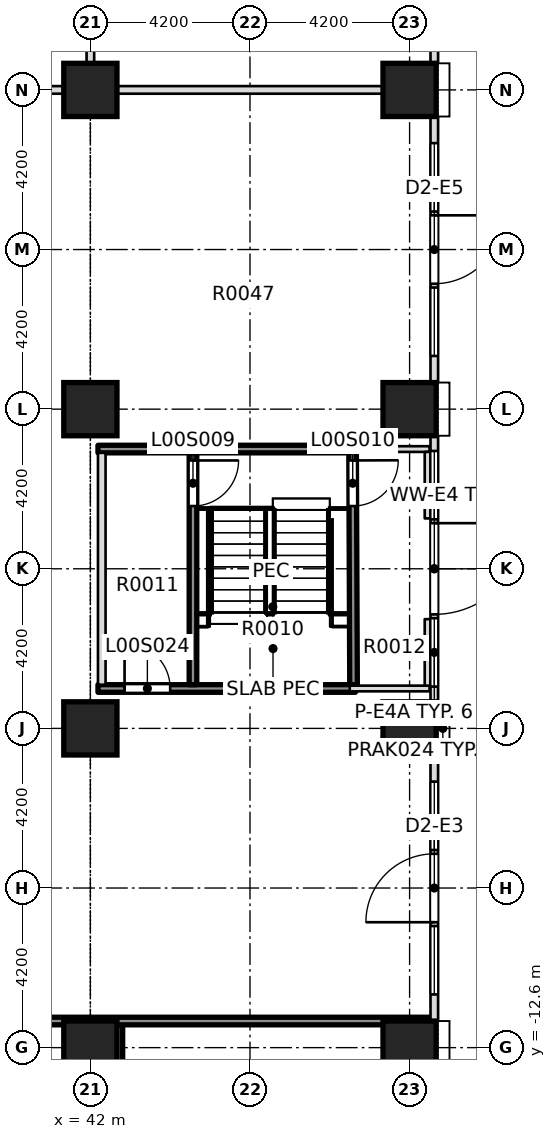
"""IFC4 building model, lengths in metres.
Left out: names, types, materials, properties, quantities, classifications, styles, units other than length and angle.
Written with IfcOpenShell. Run it as: python <this file> out.ifc"""

import sys

from ifc_helpers import new_model, si_unit, direction, frame, frame_2d, origin, origin_2d, place, context, subcontext, project, spatial, rectangle, extrude, element, fill, save


model = new_model("IFC4")
c1 = context("Model", 3, precision=1e-05, world=origin(), true_north=direction((0.0, 1.0)))
c2 = subcontext(c1, "Body", "Model", "MODEL_VIEW")
j1 = project(units=[si_unit("LENGTHUNIT", "METRE"), si_unit("PLANEANGLEUNIT", "RADIAN")], contexts=[c1])
p1 = place(None, origin())
s1 = spatial("IfcSite", under=j1, at=p1, CompositionType="ELEMENT")
p2 = place(p1, origin())
s2 = spatial("IfcBuilding", under=s1, at=p2, CompositionType="ELEMENT")
p3 = place(p2, origin())
s3 = spatial("IfcBuildingStorey", under=s2, at=p3, CompositionType="ELEMENT", Elevation=0.0)
for number, where, z_axis, x_axis in (
    (1, (42.0, -12.6, 0.0), (0.0, 0.0, 1.0), (1.0, 0.0, 0.0)),
    (2, (50.4, -12.6, 0.0), (0.0, 0.0, 1.0), (1.0, 0.0, 0.0)),
    (3, (42.0, -4.2, 0.0), (0.0, 0.0, 1.0), (1.0, 0.0, 0.0)),
    (4, (50.4, -4.2, 0.0), (0.0, 0.0, 1.0), (1.0, 0.0, 0.0)),
    (5, (42.0, 4.2, 0.0), (0.0, 0.0, 1.0), (1.0, 0.0, 0.0)),
    (6, (50.4, 4.2, 0.0), (0.0, 0.0, 1.0), (1.0, 0.0, 0.0)),
    (7, (42.0, 12.6, 0.0), (0.0, 0.0, 1.0), (1.0, 0.0, 0.0)),
    (8, (50.4, 12.6, 0.0), (0.0, 0.0, 1.0), (1.0, 0.0, 0.0)),
):
    element("IfcColumn", number, at=place(p3, frame(where, z_axis=z_axis, x_axis=x_axis)), inside=s3, PredefinedType="COLUMN", context=c2, shape_type="SweptSolid", body=[
        extrude(rectangle(XDim=1.4, YDim=1.4, at=origin_2d()), origin(), (0.0, 0.0, 1.0), 7.5),
    ])
p4 = place(p3, frame((42.2, -3.15, 0.0), z_axis=(0.0, 0.0, 1.0), x_axis=(1.0, 0.0, 0.0)))
e9 = element("IfcWall", 9, at=p4, inside=s3, PredefinedType="SOLIDWALL", context=c2, shape_type="SweptSolid", body=[
    extrude(rectangle(XDim=6.775, YDim=0.2, at=frame_2d((3.388, 0.0))), origin(), (0.0, 0.0, 1.0), 7.1),
])
p5 = place(p4, frame((0.7, 0.0, 0.0)))
e10 = element("IfcOpeningElement", 10, at=p5, cuts=e9, PredefinedType="OPENING", context=c2, shape_type="SweptSolid", body=[
    extrude(rectangle(XDim=1.2, YDim=2.1, at=frame_2d((0.6, 1.05))), frame((0.0, 0.11, 0.0), z_axis=(0.0, -1.0, 0.0), x_axis=(1.0, 0.0, 0.0)), (0.0, 0.0, 1.0), 0.22),
])
p6 = place(p3, frame((48.825, -3.15, 0.0), z_axis=(0.0, 0.0, 1.0), x_axis=(1.0, 0.0, 0.0)))
e11 = element("IfcWall", 11, at=p6, inside=s3, PredefinedType="PARTITIONING", context=c2, shape_type="SweptSolid", body=[
    extrude(rectangle(XDim=2.1, YDim=0.15, at=frame_2d((1.05, 0.0))), origin(), (0.0, 0.0, 1.0), 7.1),
])
p7 = place(p3, frame((42.2, 3.15, 0.0), z_axis=(0.0, 0.0, 1.0), x_axis=(1.0, 0.0, 0.0)))
e12 = element("IfcWall", 12, at=p7, inside=s3, PredefinedType="SOLIDWALL", context=c2, shape_type="SweptSolid", body=[
    extrude(rectangle(XDim=6.775, YDim=0.2, at=frame_2d((3.388, 0.0))), origin(), (0.0, 0.0, 1.0), 7.1),
])
p8 = place(p3, frame((48.825, 3.15, 0.0), z_axis=(0.0, 0.0, 1.0), x_axis=(1.0, 0.0, 0.0)))
e13 = element("IfcWall", 13, at=p8, inside=s3, PredefinedType="PARTITIONING", context=c2, shape_type="SweptSolid", body=[
    extrude(rectangle(XDim=2.1, YDim=0.15, at=frame_2d((1.05, 0.0))), origin(), (0.0, 0.0, 1.0), 7.1),
])
p9 = place(p3, frame((16.875, 12.6, 0.0), z_axis=(0.0, 0.0, 1.0), x_axis=(1.0, 0.0, 0.0)))
e14 = element("IfcWall", 14, at=p9, inside=s3, PredefinedType="PARTITIONING", context=c2, shape_type="SweptSolid", body=[
    extrude(rectangle(XDim=34.075, YDim=0.2, at=frame_2d((17.038, 0.0))), origin(), (0.0, 0.0, 1.0), 7.1),
])
p10 = place(p9, frame((17.525, 0.0, 0.0)))
e15 = element("IfcOpeningElement", 15, at=p10, cuts=e14, PredefinedType="OPENING", context=c2, shape_type="SweptSolid", body=[
    extrude(rectangle(XDim=0.9, YDim=2.1, at=frame_2d((0.45, 1.05))), frame((0.0, 0.11, 0.0), z_axis=(0.0, -1.0, 0.0), x_axis=(1.0, 0.0, 0.0)), (0.0, 0.0, 1.0), 0.22),
])
p11 = place(p3, frame((42.0, 12.7, 0.0), z_axis=(0.0, 0.0, 1.0), x_axis=(0.0, 1.0, 0.0)))
e16 = element("IfcWall", 16, at=p11, inside=s3, PredefinedType="PARTITIONING", context=c2, shape_type="SweptSolid", body=[
    extrude(rectangle(XDim=8.525, YDim=0.2, at=frame_2d((4.263, 0.0))), origin(), (0.0, 0.0, 1.0), 7.1),
])
p12 = place(p11, frame((3.812, 0.0, 0.0)))
e17 = element("IfcOpeningElement", 17, at=p12, cuts=e16, PredefinedType="OPENING", context=c2, shape_type="SweptSolid", body=[
    extrude(rectangle(XDim=0.9, YDim=2.1, at=frame_2d((0.45, 1.05))), frame((0.0, 0.11, 0.0), z_axis=(0.0, -1.0, 0.0), x_axis=(1.0, 0.0, 0.0)), (0.0, 0.0, 1.0), 0.22),
])
p13 = place(p3, frame((42.3, -3.05, 0.0), z_axis=(0.0, 0.0, 1.0), x_axis=(0.0, 1.0, 0.0)))
e18 = element("IfcWall", 18, at=p13, inside=s3, PredefinedType="PARTITIONING", context=c2, shape_type="SweptSolid", body=[
    extrude(rectangle(XDim=6.1, YDim=0.2, at=frame_2d((3.05, 0.0))), origin(), (0.0, 0.0, 1.0), 7.1),
])
p14 = place(p3, frame((44.7, -3.05, 0.0), z_axis=(0.0, 0.0, 1.0), x_axis=(0.0, 1.0, 0.0)))
e19 = element("IfcWall", 19, at=p14, inside=s3, PredefinedType="SOLIDWALL", context=c2, shape_type="SweptSolid", body=[
    extrude(rectangle(XDim=6.1, YDim=0.2, at=frame_2d((3.05, 0.0))), origin(), (0.0, 0.0, 1.0), 7.1),
])
p15 = place(p14, frame((4.7, 0.0, 0.0)))
e20 = element("IfcOpeningElement", 20, at=p15, cuts=e19, PredefinedType="OPENING", context=c2, shape_type="SweptSolid", body=[
    extrude(rectangle(XDim=1.2, YDim=2.1, at=frame_2d((0.6, 1.05))), frame((0.0, 0.11, 0.0), z_axis=(0.0, -1.0, 0.0), x_axis=(1.0, 0.0, 0.0)), (0.0, 0.0, 1.0), 0.22),
])
p16 = place(p3, frame((48.925, -3.05, 0.0), z_axis=(0.0, 0.0, 1.0), x_axis=(-0.004065655173, 0.99999173519, 0.0)))
e21 = element("IfcWall", 21, at=p16, inside=s3, PredefinedType="SOLIDWALL", context=c2, shape_type="SweptSolid", body=[
    extrude(rectangle(XDim=6.125, YDim=0.2, at=frame_2d((3.062, 0.0))), origin(), (0.0, 0.0, 1.0), 7.1),
])
p17 = place(p16, frame((4.7, 0.0, 0.0)))
e22 = element("IfcOpeningElement", 22, at=p17, cuts=e21, PredefinedType="OPENING", context=c2, shape_type="SweptSolid", body=[
    extrude(rectangle(XDim=1.2, YDim=2.1, at=frame_2d((0.6, 1.05))), frame((0.0, 0.11, 0.0), z_axis=(0.0, -1.0, 0.0), x_axis=(1.0, 0.0, 0.0)), (0.0, 0.0, 1.0), 0.22),
])
p18 = place(p3, frame((50.873, -3.075, 0.0), z_axis=(0.0, 0.0, 1.0), x_axis=(0.0, 1.0, 0.0)))
e23 = element("IfcWall", 23, at=p18, inside=s3, PredefinedType="PARTITIONING", context=c2, shape_type="SweptSolid", body=[
    extrude(rectangle(XDim=1.75, YDim=0.15, at=frame_2d((0.875, 0.0))), origin(), (0.0, 0.0, 1.0), 7.1),
])
p19 = place(p3, frame((51.05, -4.9, 0.0), z_axis=(0.0, 0.0, 1.0), x_axis=(0.0, -1.0, 0.0)))
e24 = element("IfcWall", 24, at=p19, inside=s3, PredefinedType="STANDARD", context=c2, shape_type="SweptSolid", body=[
    extrude(rectangle(XDim=7.0, YDim=0.2, at=frame_2d((3.5, 0.0))), origin(), (0.0, 0.0, 1.0), 7.1),
])
p20 = place(p19, frame((4.5, 0.0, 0.3)))
e25 = element("IfcOpeningElement", 25, at=p20, cuts=e24, PredefinedType="OPENING", context=c2, shape_type="SweptSolid", body=[
    extrude(rectangle(XDim=1.8, YDim=4.2, at=frame_2d((0.9, 2.1))), frame((0.0, 0.11, 0.0), z_axis=(0.0, -1.0, 0.0), x_axis=(1.0, 0.0, 0.0)), (0.0, 0.0, 1.0), 0.22),
])
p21 = place(p19, frame((2.6, 0.0, 0.0)))
e26 = element("IfcOpeningElement", 26, at=p21, cuts=e24, PredefinedType="OPENING", context=c2, shape_type="SweptSolid", body=[
    extrude(rectangle(XDim=1.8, YDim=2.4, at=frame_2d((0.9, 1.2))), frame((0.0, 0.11, 0.0), z_axis=(0.0, -1.0, 0.0), x_axis=(1.0, 0.0, 0.0)), (0.0, 0.0, 1.0), 0.22),
])
p22 = place(p19, frame((0.7, 0.0, 0.3)))
e27 = element("IfcOpeningElement", 27, at=p22, cuts=e24, PredefinedType="OPENING", context=c2, shape_type="SweptSolid", body=[
    extrude(rectangle(XDim=1.8, YDim=4.2, at=frame_2d((0.9, 2.1))), frame((0.0, 0.11, 0.0), z_axis=(0.0, -1.0, 0.0), x_axis=(1.0, 0.0, 0.0)), (0.0, 0.0, 1.0), 0.22),
])
p23 = place(p3, frame((51.05, 3.5, 0.0), z_axis=(0.0, 0.0, 1.0), x_axis=(0.0, -1.0, 0.0)))
e28 = element("IfcWall", 28, at=p23, inside=s3, PredefinedType="STANDARD", context=c2, shape_type="SweptSolid", body=[
    extrude(rectangle(XDim=7.0, YDim=0.2, at=frame_2d((3.5, 0.0))), origin(), (0.0, 0.0, 1.0), 7.1),
])
p24 = place(p23, frame((4.8, 0.0, 0.3)))
e29 = element("IfcOpeningElement", 29, at=p24, cuts=e28, PredefinedType="OPENING", context=c2, shape_type="SweptSolid", body=[
    extrude(rectangle(XDim=1.8, YDim=4.2, at=frame_2d((0.9, 2.1))), frame((0.0, 0.11, 0.0), z_axis=(0.0, -1.0, 0.0), x_axis=(1.0, 0.0, 0.0)), (0.0, 0.0, 1.0), 0.22),
])
p25 = place(p23, frame((2.3, 0.0, 0.0)))
e30 = element("IfcOpeningElement", 30, at=p25, cuts=e28, PredefinedType="OPENING", context=c2, shape_type="SweptSolid", body=[
    extrude(rectangle(XDim=2.4, YDim=2.4, at=frame_2d((1.2, 1.2))), frame((0.0, 0.11, 0.0), z_axis=(0.0, -1.0, 0.0), x_axis=(1.0, 0.0, 0.0)), (0.0, 0.0, 1.0), 0.22),
])
p26 = place(p23, frame((0.4, 0.0, 0.3)))
e31 = element("IfcOpeningElement", 31, at=p26, cuts=e28, PredefinedType="OPENING", context=c2, shape_type="SweptSolid", body=[
    extrude(rectangle(XDim=1.8, YDim=4.2, at=frame_2d((0.9, 2.1))), frame((0.0, 0.11, 0.0), z_axis=(0.0, -1.0, 0.0), x_axis=(1.0, 0.0, 0.0)), (0.0, 0.0, 1.0), 0.22),
])
p27 = place(p3, frame((51.05, 11.9, 0.0), z_axis=(0.0, 0.0, 1.0), x_axis=(0.0, -1.0, 0.0)))
e32 = element("IfcWall", 32, at=p27, inside=s3, PredefinedType="STANDARD", context=c2, shape_type="SweptSolid", body=[
    extrude(rectangle(XDim=7.0, YDim=0.2, at=frame_2d((3.5, 0.0))), origin(), (0.0, 0.0, 1.0), 7.1),
])
p28 = place(p27, frame((4.5, 0.0, 0.3)))
e33 = element("IfcOpeningElement", 33, at=p28, cuts=e32, PredefinedType="OPENING", context=c2, shape_type="SweptSolid", body=[
    extrude(rectangle(XDim=1.8, YDim=4.2, at=frame_2d((0.9, 2.1))), frame((0.0, 0.11, 0.0), z_axis=(0.0, -1.0, 0.0), x_axis=(1.0, 0.0, 0.0)), (0.0, 0.0, 1.0), 0.22),
])
p29 = place(p27, frame((2.6, 0.0, 0.0)))
e34 = element("IfcOpeningElement", 34, at=p29, cuts=e32, PredefinedType="OPENING", context=c2, shape_type="SweptSolid", body=[
    extrude(rectangle(XDim=1.8, YDim=2.4, at=frame_2d((0.9, 1.2))), frame((0.0, 0.11, 0.0), z_axis=(0.0, -1.0, 0.0), x_axis=(1.0, 0.0, 0.0)), (0.0, 0.0, 1.0), 0.22),
])
p30 = place(p27, frame((0.7, 0.0, 0.3)))
e35 = element("IfcOpeningElement", 35, at=p30, cuts=e32, PredefinedType="OPENING", context=c2, shape_type="SweptSolid", body=[
    extrude(rectangle(XDim=1.8, YDim=4.2, at=frame_2d((0.9, 2.1))), frame((0.0, 0.11, 0.0), z_axis=(0.0, -1.0, 0.0), x_axis=(1.0, 0.0, 0.0)), (0.0, 0.0, 1.0), 0.22),
])
p31 = place(p3, frame((51.05, 13.3, 0.0), z_axis=(0.0, 0.0, 1.0), x_axis=(0.0, 1.0, 0.0)))
e36 = element("IfcWall", 36, at=p31, inside=s3, PredefinedType="STANDARD", context=c2, shape_type="SweptSolid", body=[
    extrude(rectangle(XDim=7.0, YDim=0.2, at=frame_2d((3.5, 0.0))), origin(), (0.0, 0.0, 1.0), 7.1),
])
p32 = place(p31, frame((1.7, 0.0, 0.3)))
e37 = element("IfcOpeningElement", 37, at=p32, cuts=e36, PredefinedType="OPENING", context=c2, shape_type="SweptSolid", body=[
    extrude(rectangle(XDim=3.6, YDim=4.2, at=frame_2d((1.8, 2.1))), frame((0.0, 0.11, 0.0), z_axis=(0.0, -1.0, 0.0), x_axis=(1.0, 0.0, 0.0)), (0.0, 0.0, 1.0), 0.22),
])
p33 = place(p3, frame((42.75, -18.125, 0.0), z_axis=(0.0, 0.0, 1.0), x_axis=(0.0, 1.0, 0.0)))
e38 = element("IfcWall", 38, at=p33, inside=s3, PredefinedType="SOLIDWALL", context=c2, shape_type="SweptSolid", body=[
    extrude(rectangle(XDim=6.125, YDim=0.2, at=frame_2d((3.062, 0.0))), origin(), (0.0, 0.0, 1.0), 7.1),
])
p34 = place(p3, frame((25.3, -11.9, 0.0), z_axis=(0.0, 0.0, 1.0), x_axis=(1.0, 0.0, 0.0)))
e39 = element("IfcWall", 39, at=p34, inside=s3, PredefinedType="SOLIDWALL", context=c2, shape_type="SweptSolid", body=[
    extrude(rectangle(XDim=25.65, YDim=0.2, at=frame_2d((12.825, 0.0))), origin(), (0.0, 0.0, 1.0), 7.1),
])
p35 = place(p3, frame((50.873, 1.325, 0.0), z_axis=(0.0, 0.0, 1.0), x_axis=(0.0, 1.0, 0.0)))
e40 = element("IfcWall", 40, at=p35, inside=s3, PredefinedType="PARTITIONING", context=c2, shape_type="SweptSolid", body=[
    extrude(rectangle(XDim=1.75, YDim=0.15, at=frame_2d((0.875, 0.0))), origin(), (0.0, 0.0, 1.0), 7.1),
])
p36 = place(p15, origin())
e41 = element("IfcDoor", 41, at=p36, inside=s3, OperationType="DOUBLE_DOOR_SINGLE_SWING", PredefinedType="DOOR", context=c2, shape_type="SweptSolid", body=[
    extrude(rectangle(XDim=1.2, YDim=2.1, at=frame_2d((0.6, 1.05))), frame((0.0, 0.025, 0.0), z_axis=(0.0, -1.0, 0.0), x_axis=(1.0, 0.0, 0.0)), (0.0, 0.0, 1.0), 0.05),
])
fill(e20, e41)
p37 = place(p17, origin())
e42 = element("IfcDoor", 42, at=p37, inside=s3, OperationType="DOUBLE_DOOR_SINGLE_SWING", PredefinedType="DOOR", context=c2, shape_type="SweptSolid", body=[
    extrude(rectangle(XDim=1.2, YDim=2.1, at=frame_2d((0.6, 1.05))), frame((0.0, 0.025, 0.0), z_axis=(0.0, -1.0, 0.0), x_axis=(1.0, 0.0, 0.0)), (0.0, 0.0, 1.0), 0.05),
])
fill(e22, e42)
p38 = place(p5, origin())
e43 = element("IfcDoor", 43, at=p38, inside=s3, OperationType="SINGLE_SWING_LEFT", PredefinedType="DOOR", context=c2, shape_type="SweptSolid", body=[
    extrude(rectangle(XDim=1.2, YDim=2.1, at=frame_2d((0.6, 1.05))), frame((0.0, 0.025, 0.0), z_axis=(0.0, -1.0, 0.0), x_axis=(1.0, 0.0, 0.0)), (0.0, 0.0, 1.0), 0.05),
])
fill(e10, e43)
p39 = place(p20, origin())
e44 = element("IfcWindow", 44, at=p39, inside=s3, PartitioningType="SINGLE_PANEL", PredefinedType="WINDOW", context=c2, shape_type="SweptSolid", body=[
    extrude(rectangle(XDim=1.8, YDim=4.2, at=frame_2d((0.9, 2.1))), frame((0.0, 0.03, 0.0), z_axis=(0.0, -1.0, 0.0), x_axis=(1.0, 0.0, 0.0)), (0.0, 0.0, 1.0), 0.06),
])
fill(e25, e44)
p40 = place(p21, origin())
e45 = element("IfcDoor", 45, at=p40, inside=s3, OperationType="SINGLE_SWING_LEFT", PredefinedType="DOOR", context=c2, shape_type="SweptSolid", body=[
    extrude(rectangle(XDim=1.8, YDim=2.4, at=frame_2d((0.9, 1.2))), frame((0.0, 0.025, 0.0), z_axis=(0.0, -1.0, 0.0), x_axis=(1.0, 0.0, 0.0)), (0.0, 0.0, 1.0), 0.05),
])
fill(e26, e45)
p41 = place(p22, origin())
e46 = element("IfcWindow", 46, at=p41, inside=s3, PartitioningType="SINGLE_PANEL", PredefinedType="WINDOW", context=c2, shape_type="SweptSolid", body=[
    extrude(rectangle(XDim=1.8, YDim=4.2, at=frame_2d((0.9, 2.1))), frame((0.0, 0.03, 0.0), z_axis=(0.0, -1.0, 0.0), x_axis=(1.0, 0.0, 0.0)), (0.0, 0.0, 1.0), 0.06),
])
fill(e27, e46)
p42 = place(p24, origin())
e47 = element("IfcWindow", 47, at=p42, inside=s3, PartitioningType="SINGLE_PANEL", PredefinedType="WINDOW", context=c2, shape_type="SweptSolid", body=[
    extrude(rectangle(XDim=1.8, YDim=4.2, at=frame_2d((0.9, 2.1))), frame((0.0, 0.03, 0.0), z_axis=(0.0, -1.0, 0.0), x_axis=(1.0, 0.0, 0.0)), (0.0, 0.0, 1.0), 0.06),
])
fill(e29, e47)
p43 = place(p25, origin())
e48 = element("IfcDoor", 48, at=p43, inside=s3, OperationType="SINGLE_SWING_LEFT", PredefinedType="DOOR", context=c2, shape_type="SweptSolid", body=[
    extrude(rectangle(XDim=2.4, YDim=2.4, at=frame_2d((1.2, 1.2))), frame((0.0, 0.025, 0.0), z_axis=(0.0, -1.0, 0.0), x_axis=(1.0, 0.0, 0.0)), (0.0, 0.0, 1.0), 0.05),
])
fill(e30, e48)
p44 = place(p26, origin())
e49 = element("IfcWindow", 49, at=p44, inside=s3, PartitioningType="SINGLE_PANEL", PredefinedType="WINDOW", context=c2, shape_type="SweptSolid", body=[
    extrude(rectangle(XDim=1.8, YDim=4.2, at=frame_2d((0.9, 2.1))), frame((0.0, 0.03, 0.0), z_axis=(0.0, -1.0, 0.0), x_axis=(1.0, 0.0, 0.0)), (0.0, 0.0, 1.0), 0.06),
])
fill(e31, e49)
p45 = place(p28, origin())
e50 = element("IfcWindow", 50, at=p45, inside=s3, PartitioningType="SINGLE_PANEL", PredefinedType="WINDOW", context=c2, shape_type="SweptSolid", body=[
    extrude(rectangle(XDim=1.8, YDim=4.2, at=frame_2d((0.9, 2.1))), frame((0.0, 0.03, 0.0), z_axis=(0.0, -1.0, 0.0), x_axis=(1.0, 0.0, 0.0)), (0.0, 0.0, 1.0), 0.06),
])
fill(e33, e50)
p46 = place(p29, origin())
e51 = element("IfcDoor", 51, at=p46, inside=s3, OperationType="SINGLE_SWING_LEFT", PredefinedType="DOOR", context=c2, shape_type="SweptSolid", body=[
    extrude(rectangle(XDim=1.8, YDim=2.4, at=frame_2d((0.9, 1.2))), frame((0.0, 0.025, 0.0), z_axis=(0.0, -1.0, 0.0), x_axis=(1.0, 0.0, 0.0)), (0.0, 0.0, 1.0), 0.05),
])
fill(e34, e51)
p47 = place(p30, origin())
e52 = element("IfcWindow", 52, at=p47, inside=s3, PartitioningType="SINGLE_PANEL", PredefinedType="WINDOW", context=c2, shape_type="SweptSolid", body=[
    extrude(rectangle(XDim=1.8, YDim=4.2, at=frame_2d((0.9, 2.1))), frame((0.0, 0.03, 0.0), z_axis=(0.0, -1.0, 0.0), x_axis=(1.0, 0.0, 0.0)), (0.0, 0.0, 1.0), 0.06),
])
fill(e35, e52)
save(model, sys.argv[1])
